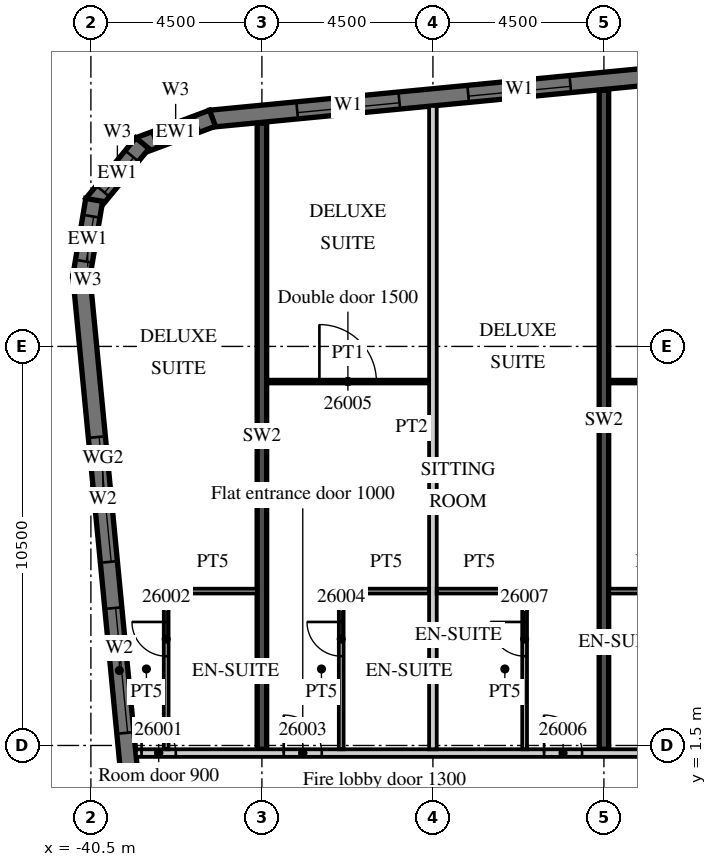
"""IFC4 building model, lengths in metres.
Left out: names, types, materials, properties, quantities, classifications, styles, units other than length and angle.
Written with IfcOpenShell. Run it as: python <this file> out.ifc"""

import sys

from ifc_helpers import new_model, si_unit, direction, frame, frame_2d, origin, place, context, subcontext, project, spatial, polyline, rectangle, outline, extrude, element, fill, save


model = new_model("IFC4")
c1 = context("Model", 3, precision=1e-05, world=origin(), true_north=direction((0.0, 1.0)))
c2 = subcontext(c1, "Body", "Model", "MODEL_VIEW")
j1 = project(units=[si_unit("LENGTHUNIT", "METRE"), si_unit("PLANEANGLEUNIT", "RADIAN")], contexts=[c1])
p1 = place(None, origin())
s1 = spatial("IfcSite", under=j1, at=p1, CompositionType="ELEMENT")
p2 = place(p1, origin())
s2 = spatial("IfcBuilding", under=s1, at=p2, CompositionType="ELEMENT")
p3 = place(p2, frame((0.0, 0.0, 120.7)))
s3 = spatial("IfcBuildingStorey", under=s2, at=p3, CompositionType="ELEMENT", Elevation=120.7)
p4 = place(p3, frame((-36.0, 1.4, 0.0), z_axis=(0.0, 0.0, 1.0), x_axis=(0.0, 1.0, 0.0)))
e1 = element("IfcWall", 1, at=p4, inside=s3, PredefinedType="SHEAR", context=c2, shape_type="SweptSolid", body=[
    extrude(rectangle(XDim=16.474, YDim=0.25, at=frame_2d((8.237, 0.0))), origin(), (0.0, 0.0, 1.0), 3.3),
])
p5 = place(p3, frame((-27.0, 1.4, 0.0), z_axis=(0.0, 0.0, 1.0), x_axis=(0.0, 1.0, 0.0)))
e2 = element("IfcWall", 2, at=p5, inside=s3, PredefinedType="SHEAR", context=c2, shape_type="SweptSolid", body=[
    extrude(rectangle(XDim=17.34, YDim=0.25, at=frame_2d((8.67, 0.0))), origin(), (0.0, 0.0, 1.0), 3.3),
])
p6 = place(p3, frame((-40.753, 13.872, 0.0), z_axis=(0.0, 0.0, 1.0), x_axis=(0.095843327381, -0.995396431878, 0.0)))
e3 = element("IfcWall", 3, at=p6, inside=s3, PredefinedType="SOLIDWALL", context=c2, shape_type="SweptSolid", body=[
    extrude(rectangle(XDim=35.0, YDim=0.45, at=frame_2d((17.5, 0.0))), origin(), (0.0, 0.0, 1.0), 3.02),
])
p7 = place(p6, frame((4.277, 0.0, 0.45)))
e4 = element("IfcOpeningElement", 4, at=p7, cuts=e3, PredefinedType="OPENING", context=c2, shape_type="SweptSolid", body=[
    extrude(rectangle(XDim=3.3, YDim=2.25, at=frame_2d((1.65, 1.125))), frame((0.0, 0.235, 0.0), z_axis=(0.0, -1.0, 0.0), x_axis=(1.0, 0.0, 0.0)), (0.0, 0.0, 1.0), 0.47),
])
p8 = place(p6, frame((8.798, 0.0, 0.45)))
e5 = element("IfcOpeningElement", 5, at=p8, cuts=e3, PredefinedType="OPENING", context=c2, shape_type="SweptSolid", body=[
    extrude(rectangle(XDim=3.3, YDim=2.25, at=frame_2d((1.65, 1.125))), frame((0.0, 0.235, 0.0), z_axis=(0.0, -1.0, 0.0), x_axis=(1.0, 0.0, 0.0)), (0.0, 0.0, 1.0), 0.47),
])
p9 = place(p3, frame((13.521, 22.89, 0.0), z_axis=(0.0, 0.0, 1.0), x_axis=(-0.995396445054, -0.095843190545, 0.0)))
e6 = element("IfcWall", 6, at=p9, inside=s3, PredefinedType="SOLIDWALL", context=c2, shape_type="SweptSolid", body=[
    extrude(rectangle(XDim=51.114, YDim=0.45, at=frame_2d((25.557, 0.0))), origin(), (0.0, 0.0, 1.0), 3.02),
])
p10 = place(p9, frame((0.91, 0.0, 0.45)))
e7 = element("IfcOpeningElement", 7, at=p10, cuts=e6, PredefinedType="OPENING", context=c2, shape_type="SweptSolid", body=[
    extrude(rectangle(XDim=2.7, YDim=2.25, at=frame_2d((1.35, 1.125))), frame((0.0, 0.235, 0.0), z_axis=(0.0, -1.0, 0.0), x_axis=(1.0, 0.0, 0.0)), (0.0, 0.0, 1.0), 0.47),
])
p11 = place(p9, frame((5.431, 0.0, 0.45)))
e8 = element("IfcOpeningElement", 8, at=p11, cuts=e6, PredefinedType="OPENING", context=c2, shape_type="SweptSolid", body=[
    extrude(rectangle(XDim=2.7, YDim=2.25, at=frame_2d((1.35, 1.125))), frame((0.0, 0.235, 0.0), z_axis=(0.0, -1.0, 0.0), x_axis=(1.0, 0.0, 0.0)), (0.0, 0.0, 1.0), 0.47),
])
p12 = place(p9, frame((9.952, 0.0, 0.45)))
e9 = element("IfcOpeningElement", 9, at=p12, cuts=e6, PredefinedType="OPENING", context=c2, shape_type="SweptSolid", body=[
    extrude(rectangle(XDim=2.7, YDim=2.25, at=frame_2d((1.35, 1.125))), frame((0.0, 0.235, 0.0), z_axis=(0.0, -1.0, 0.0), x_axis=(1.0, 0.0, 0.0)), (0.0, 0.0, 1.0), 0.47),
])
p13 = place(p9, frame((14.473, 0.0, 0.45)))
e10 = element("IfcOpeningElement", 10, at=p13, cuts=e6, PredefinedType="OPENING", context=c2, shape_type="SweptSolid", body=[
    extrude(rectangle(XDim=2.7, YDim=2.25, at=frame_2d((1.35, 1.125))), frame((0.0, 0.235, 0.0), z_axis=(0.0, -1.0, 0.0), x_axis=(1.0, 0.0, 0.0)), (0.0, 0.0, 1.0), 0.47),
])
p14 = place(p9, frame((18.994, 0.0, 0.45)))
e11 = element("IfcOpeningElement", 11, at=p14, cuts=e6, PredefinedType="OPENING", context=c2, shape_type="SweptSolid", body=[
    extrude(rectangle(XDim=2.7, YDim=2.25, at=frame_2d((1.35, 1.125))), frame((0.0, 0.235, 0.0), z_axis=(0.0, -1.0, 0.0), x_axis=(1.0, 0.0, 0.0)), (0.0, 0.0, 1.0), 0.47),
])
p15 = place(p9, frame((23.514, 0.0, 0.45)))
e12 = element("IfcOpeningElement", 12, at=p15, cuts=e6, PredefinedType="OPENING", context=c2, shape_type="SweptSolid", body=[
    extrude(rectangle(XDim=2.7, YDim=2.25, at=frame_2d((1.35, 1.125))), frame((0.0, 0.235, 0.0), z_axis=(0.0, -1.0, 0.0), x_axis=(1.0, 0.0, 0.0)), (0.0, 0.0, 1.0), 0.47),
])
p16 = place(p9, frame((28.035, 0.0, 0.45)))
e13 = element("IfcOpeningElement", 13, at=p16, cuts=e6, PredefinedType="OPENING", context=c2, shape_type="SweptSolid", body=[
    extrude(rectangle(XDim=2.7, YDim=2.25, at=frame_2d((1.35, 1.125))), frame((0.0, 0.235, 0.0), z_axis=(0.0, -1.0, 0.0), x_axis=(1.0, 0.0, 0.0)), (0.0, 0.0, 1.0), 0.47),
])
p17 = place(p9, frame((32.556, 0.0, 0.45)))
e14 = element("IfcOpeningElement", 14, at=p17, cuts=e6, PredefinedType="OPENING", context=c2, shape_type="SweptSolid", body=[
    extrude(rectangle(XDim=2.7, YDim=2.25, at=frame_2d((1.35, 1.125))), frame((0.0, 0.235, 0.0), z_axis=(0.0, -1.0, 0.0), x_axis=(1.0, 0.0, 0.0)), (0.0, 0.0, 1.0), 0.47),
])
p18 = place(p9, frame((37.077, 0.0, 0.45)))
e15 = element("IfcOpeningElement", 15, at=p18, cuts=e6, PredefinedType="OPENING", context=c2, shape_type="SweptSolid", body=[
    extrude(rectangle(XDim=2.7, YDim=2.25, at=frame_2d((1.35, 1.125))), frame((0.0, 0.235, 0.0), z_axis=(0.0, -1.0, 0.0), x_axis=(1.0, 0.0, 0.0)), (0.0, 0.0, 1.0), 0.47),
])
p19 = place(p9, frame((41.598, 0.0, 0.45)))
e16 = element("IfcOpeningElement", 16, at=p19, cuts=e6, PredefinedType="OPENING", context=c2, shape_type="SweptSolid", body=[
    extrude(rectangle(XDim=2.7, YDim=2.25, at=frame_2d((1.35, 1.125))), frame((0.0, 0.235, 0.0), z_axis=(0.0, -1.0, 0.0), x_axis=(1.0, 0.0, 0.0)), (0.0, 0.0, 1.0), 0.47),
])
p20 = place(p9, frame((46.118, 0.0, 0.45)))
e17 = element("IfcOpeningElement", 17, at=p20, cuts=e6, PredefinedType="OPENING", context=c2, shape_type="SweptSolid", body=[
    extrude(rectangle(XDim=2.7, YDim=2.25, at=frame_2d((1.35, 1.125))), frame((0.0, 0.235, 0.0), z_axis=(0.0, -1.0, 0.0), x_axis=(1.0, 0.0, 0.0)), (0.0, 0.0, 1.0), 0.47),
])
p21 = place(p3, frame((-37.3, 18.004, 0.0), z_axis=(0.0, 0.0, 1.0), x_axis=(-0.936677599948, -0.350192909346, 0.0)))
e18 = element("IfcWall", 18, at=p21, inside=s3, PredefinedType="SOLIDWALL", context=c2, shape_type="SweptSolid", body=[
    extrude(outline(polyline([(0.0, -0.225), (2.071, -0.225), (1.95, 0.225), (0.121, 0.225), (0.0, -0.225)])), origin(), (0.0, 0.0, 1.0), 3.02),
])
p22 = place(p21, frame((0.435, 0.0, 0.45)))
e19 = element("IfcOpeningElement", 19, at=p22, cuts=e18, PredefinedType="OPENING", context=c2, shape_type="SweptSolid", body=[
    extrude(rectangle(XDim=1.2, YDim=2.25, at=frame_2d((0.6, 1.125))), frame((0.0, 0.235, 0.0), z_axis=(0.0, -1.0, 0.0), x_axis=(1.0, 0.0, 0.0)), (0.0, 0.0, 1.0), 0.47),
])
p23 = place(p3, frame((-39.145, 17.347, 0.0), z_axis=(0.0, 0.0, 1.0), x_axis=(-0.636046112757, -0.771651049663, 0.0)))
e20 = element("IfcWall", 20, at=p23, inside=s3, PredefinedType="SOLIDWALL", context=c2, shape_type="SweptSolid", body=[
    extrude(outline(polyline([(0.0, -0.225), (2.071, -0.225), (1.95, 0.225), (0.121, 0.225), (0.0, -0.225)])), origin(), (0.0, 0.0, 1.0), 3.02),
])
p24 = place(p23, frame((0.435, 0.0, 0.45)))
e21 = element("IfcOpeningElement", 21, at=p24, cuts=e20, PredefinedType="OPENING", context=c2, shape_type="SweptSolid", body=[
    extrude(rectangle(XDim=1.2, YDim=2.25, at=frame_2d((0.6, 1.125))), frame((0.0, 0.235, 0.0), z_axis=(0.0, -1.0, 0.0), x_axis=(1.0, 0.0, 0.0)), (0.0, 0.0, 1.0), 0.47),
])
p25 = place(p3, frame((-40.413, 15.855, 0.0), z_axis=(0.0, 0.0, 1.0), x_axis=(-0.165068144653, -0.986282164302, 0.0)))
e22 = element("IfcWall", 22, at=p25, inside=s3, PredefinedType="SOLIDWALL", context=c2, shape_type="SweptSolid", body=[
    extrude(outline(polyline([(0.0, -0.225), (2.071, -0.225), (1.95, 0.225), (0.121, 0.225), (0.0, -0.225)])), origin(), (0.0, 0.0, 1.0), 3.02),
])
p26 = place(p25, frame((0.435, 0.0, 0.45)))
e23 = element("IfcOpeningElement", 23, at=p26, cuts=e22, PredefinedType="OPENING", context=c2, shape_type="SweptSolid", body=[
    extrude(rectangle(XDim=1.2, YDim=2.25, at=frame_2d((0.6, 1.125))), frame((0.0, 0.235, 0.0), z_axis=(0.0, -1.0, 0.0), x_axis=(1.0, 0.0, 0.0)), (0.0, 0.0, 1.0), 0.47),
])
p27 = place(p3, frame((-39.316, 1.3, 0.0), z_axis=(0.0, 0.0, 1.0), x_axis=(1.0, 0.0, 0.0)))
e24 = element("IfcWall", 24, at=p27, inside=s3, PredefinedType="PARTITIONING", context=c2, shape_type="SweptSolid", body=[
    extrude(rectangle(XDim=52.816, YDim=0.2, at=frame_2d((26.408, 0.0))), origin(), (0.0, 0.0, 1.0), 3.02),
])
p28 = place(p27, frame((0.15, 0.0, 0.0)))
e25 = element("IfcOpeningElement", 25, at=p28, cuts=e24, PredefinedType="OPENING", context=c2, shape_type="SweptSolid", body=[
    extrude(rectangle(XDim=0.9, YDim=2.1, at=frame_2d((0.45, 1.05))), frame((0.0, 0.11, 0.0), z_axis=(0.0, -1.0, 0.0), x_axis=(1.0, 0.0, 0.0)), (0.0, 0.0, 1.0), 0.22),
])
p29 = place(p27, frame((3.891, 0.0, 0.0)))
e26 = element("IfcOpeningElement", 26, at=p29, cuts=e24, PredefinedType="OPENING", context=c2, shape_type="SweptSolid", body=[
    extrude(rectangle(XDim=1.0, YDim=2.1, at=frame_2d((0.5, 1.05))), frame((0.0, 0.11, 0.0), z_axis=(0.0, -1.0, 0.0), x_axis=(1.0, 0.0, 0.0)), (0.0, 0.0, 1.0), 0.22),
])
p30 = place(p27, frame((10.741, 0.0, 0.0)))
e27 = element("IfcOpeningElement", 27, at=p30, cuts=e24, PredefinedType="OPENING", context=c2, shape_type="SweptSolid", body=[
    extrude(rectangle(XDim=1.0, YDim=2.1, at=frame_2d((0.5, 1.05))), frame((0.0, 0.11, 0.0), z_axis=(0.0, -1.0, 0.0), x_axis=(1.0, 0.0, 0.0)), (0.0, 0.0, 1.0), 0.22),
])
p31 = place(p27, frame((15.266, 0.0, 0.0)))
e28 = element("IfcOpeningElement", 28, at=p31, cuts=e24, PredefinedType="OPENING", context=c2, shape_type="SweptSolid", body=[
    extrude(rectangle(XDim=1.0, YDim=2.1, at=frame_2d((0.5, 1.05))), frame((0.0, 0.11, 0.0), z_axis=(0.0, -1.0, 0.0), x_axis=(1.0, 0.0, 0.0)), (0.0, 0.0, 1.0), 0.22),
])
p32 = place(p27, frame((19.741, 0.0, 0.0)))
e29 = element("IfcOpeningElement", 29, at=p32, cuts=e24, PredefinedType="OPENING", context=c2, shape_type="SweptSolid", body=[
    extrude(rectangle(XDim=1.0, YDim=2.1, at=frame_2d((0.5, 1.05))), frame((0.0, 0.11, 0.0), z_axis=(0.0, -1.0, 0.0), x_axis=(1.0, 0.0, 0.0)), (0.0, 0.0, 1.0), 0.22),
])
p33 = place(p27, frame((26.678, 0.0, 0.0)))
e30 = element("IfcOpeningElement", 30, at=p33, cuts=e24, PredefinedType="OPENING", context=c2, shape_type="SweptSolid", body=[
    extrude(rectangle(XDim=1.2, YDim=2.1, at=frame_2d((0.6, 1.05))), frame((0.0, 0.11, 0.0), z_axis=(0.0, -1.0, 0.0), x_axis=(1.0, 0.0, 0.0)), (0.0, 0.0, 1.0), 0.22),
])
p34 = place(p27, frame((35.678, 0.0, 0.0)))
e31 = element("IfcOpeningElement", 31, at=p34, cuts=e24, PredefinedType="OPENING", context=c2, shape_type="SweptSolid", body=[
    extrude(rectangle(XDim=1.2, YDim=2.1, at=frame_2d((0.6, 1.05))), frame((0.0, 0.11, 0.0), z_axis=(0.0, -1.0, 0.0), x_axis=(1.0, 0.0, 0.0)), (0.0, 0.0, 1.0), 0.22),
])
p35 = place(p27, frame((41.754, 0.0, 0.0)))
e32 = element("IfcOpeningElement", 32, at=p35, cuts=e24, PredefinedType="OPENING", context=c2, shape_type="SweptSolid", body=[
    extrude(rectangle(XDim=1.2, YDim=2.1, at=frame_2d((0.6, 1.05))), frame((0.0, 0.11, 0.0), z_axis=(0.0, -1.0, 0.0), x_axis=(1.0, 0.0, 0.0)), (0.0, 0.0, 1.0), 0.22),
])
p36 = place(p27, frame((51.241, 0.0, 0.0)))
e33 = element("IfcOpeningElement", 33, at=p36, cuts=e24, PredefinedType="OPENING", context=c2, shape_type="SweptSolid", body=[
    extrude(rectangle(XDim=1.0, YDim=2.1, at=frame_2d((0.5, 1.05))), frame((0.0, 0.11, 0.0), z_axis=(0.0, -1.0, 0.0), x_axis=(1.0, 0.0, 0.0)), (0.0, 0.0, 1.0), 0.22),
])
p37 = place(p3, frame((-38.519, 1.4, 0.0), z_axis=(0.0, 0.0, 1.0), x_axis=(0.0, 1.0, 0.0)))
e34 = element("IfcWall", 34, at=p37, inside=s3, PredefinedType="PARTITIONING", context=c2, shape_type="SweptSolid", body=[
    extrude(rectangle(XDim=4.225, YDim=0.125, at=frame_2d((2.113, 0.0))), origin(), (0.0, 0.0, 1.0), 3.02),
])
p38 = place(p37, frame((2.45, 0.0, 0.0)))
e35 = element("IfcOpeningElement", 35, at=p38, cuts=e34, PredefinedType="OPENING", context=c2, shape_type="SweptSolid", body=[
    extrude(rectangle(XDim=0.9, YDim=2.1, at=frame_2d((0.45, 1.05))), frame((0.0, 0.073, 0.0), z_axis=(0.0, -1.0, 0.0), x_axis=(1.0, 0.0, 0.0)), (0.0, 0.0, 1.0), 0.145),
])
p39 = place(p3, frame((-38.457, 5.562, 0.0), z_axis=(0.0, 0.0, 1.0), x_axis=(1.0, 0.0, 0.0)))
e36 = element("IfcWall", 36, at=p39, inside=s3, PredefinedType="PARTITIONING", context=c2, shape_type="SweptSolid", body=[
    extrude(rectangle(XDim=2.332, YDim=0.125, at=frame_2d((1.166, 0.0))), origin(), (0.0, 0.0, 1.0), 3.02),
])
p40 = place(p3, frame((-31.5, 1.4, 0.0), z_axis=(0.0, 0.0, 1.0), x_axis=(0.0, 1.0, 0.0)))
e37 = element("IfcWall", 37, at=p40, inside=s3, PredefinedType="PARTITIONING", context=c2, shape_type="SweptSolid", body=[
    extrude(rectangle(XDim=16.929, YDim=0.2, at=frame_2d((8.465, 0.0))), origin(), (0.0, 0.0, 1.0), 3.02),
])
p41 = place(p3, frame((-33.913, 1.4, 0.0), z_axis=(0.0, 0.0, 1.0), x_axis=(0.0, 1.0, 0.0)))
e38 = element("IfcWall", 38, at=p41, inside=s3, PredefinedType="PARTITIONING", context=c2, shape_type="SweptSolid", body=[
    extrude(rectangle(XDim=4.225, YDim=0.125, at=frame_2d((2.113, 0.0))), origin(), (0.0, 0.0, 1.0), 3.02),
])
p42 = place(p41, frame((2.45, 0.0, 0.0)))
e39 = element("IfcOpeningElement", 39, at=p42, cuts=e38, PredefinedType="OPENING", context=c2, shape_type="SweptSolid", body=[
    extrude(rectangle(XDim=0.9, YDim=2.1, at=frame_2d((0.45, 1.05))), frame((0.0, 0.073, 0.0), z_axis=(0.0, -1.0, 0.0), x_axis=(1.0, 0.0, 0.0)), (0.0, 0.0, 1.0), 0.145),
])
p43 = place(p3, frame((-33.85, 5.562, 0.0), z_axis=(0.0, 0.0, 1.0), x_axis=(1.0, 0.0, 0.0)))
e40 = element("IfcWall", 40, at=p43, inside=s3, PredefinedType="PARTITIONING", context=c2, shape_type="SweptSolid", body=[
    extrude(rectangle(XDim=2.25, YDim=0.125, at=frame_2d((1.125, 0.0))), origin(), (0.0, 0.0, 1.0), 3.02),
])
p44 = place(p3, frame((-35.875, 11.075, 0.0), z_axis=(0.0, 0.0, 1.0), x_axis=(1.0, 0.0, 0.0)))
e41 = element("IfcWall", 41, at=p44, inside=s3, PredefinedType="PARTITIONING", context=c2, shape_type="SweptSolid", body=[
    extrude(rectangle(XDim=4.275, YDim=0.1, at=frame_2d((2.137, 0.0))), origin(), (0.0, 0.0, 1.0), 3.02),
])
p45 = place(p44, frame((1.388, 0.0, 0.0)))
e42 = element("IfcOpeningElement", 42, at=p45, cuts=e41, PredefinedType="OPENING", context=c2, shape_type="SweptSolid", body=[
    extrude(rectangle(XDim=1.5, YDim=2.1, at=frame_2d((0.75, 1.05))), frame((0.0, 0.06, 0.0), z_axis=(0.0, -1.0, 0.0), x_axis=(1.0, 0.0, 0.0)), (0.0, 0.0, 1.0), 0.12),
])
p46 = place(p3, frame((-29.087, 1.4, 0.0), z_axis=(0.0, 0.0, 1.0), x_axis=(0.0, 1.0, 0.0)))
e43 = element("IfcWall", 43, at=p46, inside=s3, PredefinedType="PARTITIONING", context=c2, shape_type="SweptSolid", body=[
    extrude(rectangle(XDim=4.225, YDim=0.125, at=frame_2d((2.113, 0.0))), origin(), (0.0, 0.0, 1.0), 3.02),
])
p47 = place(p46, frame((2.45, 0.0, 0.0)))
e44 = element("IfcOpeningElement", 44, at=p47, cuts=e43, PredefinedType="OPENING", context=c2, shape_type="SweptSolid", body=[
    extrude(rectangle(XDim=0.9, YDim=2.1, at=frame_2d((0.45, 1.05))), frame((0.0, 0.073, 0.0), z_axis=(0.0, -1.0, 0.0), x_axis=(1.0, 0.0, 0.0)), (0.0, 0.0, 1.0), 0.145),
])
for number, where, z_axis, x_axis in (
    (45, (-31.4, 5.562, 0.0), (0.0, 0.0, 1.0), (1.0, 0.0, 0.0)),
    (46, (-26.875, 5.562, 0.0), (0.0, 0.0, 1.0), (1.0, 0.0, 0.0)),
):
    element("IfcWall", number, at=place(p3, frame(where, z_axis=z_axis, x_axis=x_axis)), inside=s3, PredefinedType="PARTITIONING", context=c2, shape_type="SweptSolid", body=[
        extrude(rectangle(XDim=2.25, YDim=0.125, at=frame_2d((1.125, 0.0))), origin(), (0.0, 0.0, 1.0), 3.02),
    ])
p48 = place(p3, frame((-26.875, 11.075, 0.0), z_axis=(0.0, 0.0, 1.0), x_axis=(1.0, 0.0, 0.0)))
e47 = element("IfcWall", 47, at=p48, inside=s3, PredefinedType="PARTITIONING", context=c2, shape_type="SweptSolid", body=[
    extrude(rectangle(XDim=4.275, YDim=0.1, at=frame_2d((2.137, 0.0))), origin(), (0.0, 0.0, 1.0), 3.02),
])
p49 = place(p48, frame((0.787, 0.0, 0.0)))
e48 = element("IfcOpeningElement", 48, at=p49, cuts=e47, PredefinedType="OPENING", context=c2, shape_type="SweptSolid", body=[
    extrude(rectangle(XDim=1.5, YDim=2.1, at=frame_2d((0.75, 1.05))), frame((0.0, 0.06, 0.0), z_axis=(0.0, -1.0, 0.0), x_axis=(1.0, 0.0, 0.0)), (0.0, 0.0, 1.0), 0.12),
])
p50 = place(p7, origin())
e49 = element("IfcWindow", 49, at=p50, inside=s3, PartitioningType="SINGLE_PANEL", PredefinedType="WINDOW", context=c2, shape_type="SweptSolid", body=[
    extrude(rectangle(XDim=3.3, YDim=2.25, at=frame_2d((1.65, 1.125))), frame((0.0, 0.09, 0.0), z_axis=(0.0, -1.0, 0.0), x_axis=(1.0, 0.0, 0.0)), (0.0, 0.0, 1.0), 0.06),
])
fill(e4, e49)
p51 = place(p8, origin())
e50 = element("IfcWindow", 50, at=p51, inside=s3, PartitioningType="SINGLE_PANEL", PredefinedType="WINDOW", context=c2, shape_type="SweptSolid", body=[
    extrude(rectangle(XDim=3.3, YDim=2.25, at=frame_2d((1.65, 1.125))), frame((0.0, 0.09, 0.0), z_axis=(0.0, -1.0, 0.0), x_axis=(1.0, 0.0, 0.0)), (0.0, 0.0, 1.0), 0.06),
])
fill(e5, e50)
p52 = place(p19, origin())
e51 = element("IfcWindow", 51, at=p52, inside=s3, PartitioningType="SINGLE_PANEL", PredefinedType="WINDOW", context=c2, shape_type="SweptSolid", body=[
    extrude(rectangle(XDim=2.7, YDim=2.25, at=frame_2d((1.35, 1.125))), frame((0.0, 0.09, 0.0), z_axis=(0.0, -1.0, 0.0), x_axis=(1.0, 0.0, 0.0)), (0.0, 0.0, 1.0), 0.06),
])
fill(e16, e51)
p53 = place(p20, origin())
e52 = element("IfcWindow", 52, at=p53, inside=s3, PartitioningType="SINGLE_PANEL", PredefinedType="WINDOW", context=c2, shape_type="SweptSolid", body=[
    extrude(rectangle(XDim=2.7, YDim=2.25, at=frame_2d((1.35, 1.125))), frame((0.0, 0.09, 0.0), z_axis=(0.0, -1.0, 0.0), x_axis=(1.0, 0.0, 0.0)), (0.0, 0.0, 1.0), 0.06),
])
fill(e17, e52)
p54 = place(p22, origin())
e53 = element("IfcWindow", 53, at=p54, inside=s3, PartitioningType="SINGLE_PANEL", PredefinedType="WINDOW", context=c2, shape_type="SweptSolid", body=[
    extrude(rectangle(XDim=1.2, YDim=2.25, at=frame_2d((0.6, 1.125))), frame((0.0, 0.09, 0.0), z_axis=(0.0, -1.0, 0.0), x_axis=(1.0, 0.0, 0.0)), (0.0, 0.0, 1.0), 0.06),
])
fill(e19, e53)
p55 = place(p24, origin())
e54 = element("IfcWindow", 54, at=p55, inside=s3, PartitioningType="SINGLE_PANEL", PredefinedType="WINDOW", context=c2, shape_type="SweptSolid", body=[
    extrude(rectangle(XDim=1.2, YDim=2.25, at=frame_2d((0.6, 1.125))), frame((0.0, 0.09, 0.0), z_axis=(0.0, -1.0, 0.0), x_axis=(1.0, 0.0, 0.0)), (0.0, 0.0, 1.0), 0.06),
])
fill(e21, e54)
p56 = place(p26, origin())
e55 = element("IfcWindow", 55, at=p56, inside=s3, PartitioningType="SINGLE_PANEL", PredefinedType="WINDOW", context=c2, shape_type="SweptSolid", body=[
    extrude(rectangle(XDim=1.2, YDim=2.25, at=frame_2d((0.6, 1.125))), frame((0.0, 0.09, 0.0), z_axis=(0.0, -1.0, 0.0), x_axis=(1.0, 0.0, 0.0)), (0.0, 0.0, 1.0), 0.06),
])
fill(e23, e55)
p57 = place(p28, origin())
e56 = element("IfcDoor", 56, at=p57, inside=s3, OperationType="SINGLE_SWING_LEFT", PredefinedType="DOOR", context=c2, shape_type="SweptSolid", body=[
    extrude(rectangle(XDim=0.9, YDim=2.1, at=frame_2d((0.45, 1.05))), frame((0.0, 0.025, 0.0), z_axis=(0.0, -1.0, 0.0), x_axis=(1.0, 0.0, 0.0)), (0.0, 0.0, 1.0), 0.05),
])
fill(e25, e56)
p58 = place(p38, origin())
e57 = element("IfcDoor", 57, at=p58, inside=s3, OperationType="SINGLE_SWING_RIGHT", PredefinedType="DOOR", context=c2, shape_type="SweptSolid", body=[
    extrude(rectangle(XDim=0.9, YDim=2.1, at=frame_2d((0.45, 1.05))), frame((0.0, 0.025, 0.0), z_axis=(0.0, -1.0, 0.0), x_axis=(1.0, 0.0, 0.0)), (0.0, 0.0, 1.0), 0.05),
])
fill(e35, e57)
p59 = place(p29, origin())
e58 = element("IfcDoor", 58, at=p59, inside=s3, OperationType="SINGLE_SWING_LEFT", PredefinedType="DOOR", context=c2, shape_type="SweptSolid", body=[
    extrude(rectangle(XDim=1.0, YDim=2.1, at=frame_2d((0.5, 1.05))), frame((0.0, 0.025, 0.0), z_axis=(0.0, -1.0, 0.0), x_axis=(1.0, 0.0, 0.0)), (0.0, 0.0, 1.0), 0.05),
])
fill(e26, e58)
p60 = place(p42, origin())
e59 = element("IfcDoor", 59, at=p60, inside=s3, OperationType="SINGLE_SWING_RIGHT", PredefinedType="DOOR", context=c2, shape_type="SweptSolid", body=[
    extrude(rectangle(XDim=0.9, YDim=2.1, at=frame_2d((0.45, 1.05))), frame((0.0, 0.025, 0.0), z_axis=(0.0, -1.0, 0.0), x_axis=(1.0, 0.0, 0.0)), (0.0, 0.0, 1.0), 0.05),
])
fill(e39, e59)
p61 = place(p45, origin())
e60 = element("IfcDoor", 60, at=p61, inside=s3, OperationType="SINGLE_SWING_LEFT", PredefinedType="DOOR", context=c2, shape_type="SweptSolid", body=[
    extrude(rectangle(XDim=1.5, YDim=2.1, at=frame_2d((0.75, 1.05))), frame((0.0, 0.025, 0.0), z_axis=(0.0, -1.0, 0.0), x_axis=(1.0, 0.0, 0.0)), (0.0, 0.0, 1.0), 0.05),
])
fill(e42, e60)
p62 = place(p30, origin())
e61 = element("IfcDoor", 61, at=p62, inside=s3, OperationType="SINGLE_SWING_LEFT", PredefinedType="DOOR", context=c2, shape_type="SweptSolid", body=[
    extrude(rectangle(XDim=1.0, YDim=2.1, at=frame_2d((0.5, 1.05))), frame((0.0, 0.025, 0.0), z_axis=(0.0, -1.0, 0.0), x_axis=(1.0, 0.0, 0.0)), (0.0, 0.0, 1.0), 0.05),
])
fill(e27, e61)
p63 = place(p47, origin())
e62 = element("IfcDoor", 62, at=p63, inside=s3, OperationType="SINGLE_SWING_RIGHT", PredefinedType="DOOR", context=c2, shape_type="SweptSolid", body=[
    extrude(rectangle(XDim=0.9, YDim=2.1, at=frame_2d((0.45, 1.05))), frame((0.0, 0.025, 0.0), z_axis=(0.0, -1.0, 0.0), x_axis=(1.0, 0.0, 0.0)), (0.0, 0.0, 1.0), 0.05),
])
fill(e44, e62)
save(model, sys.argv[1])
